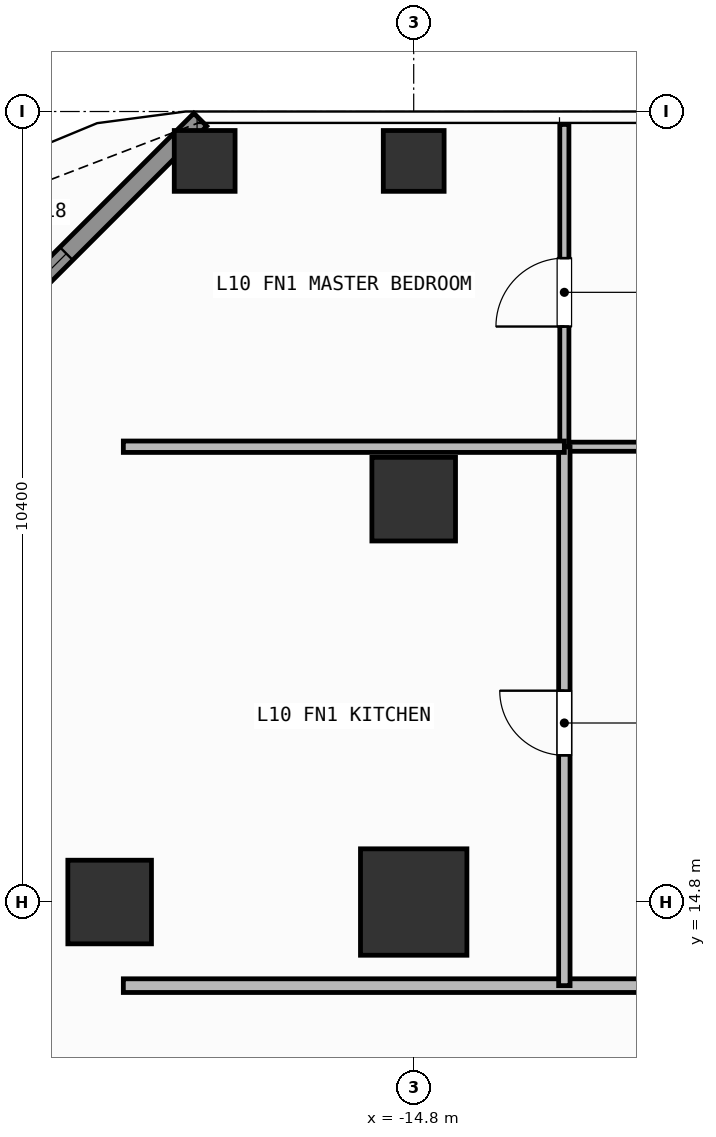
"""IFC4 building model, lengths in metres.
Left out: names, types, materials, properties, quantities, classifications, styles, units other than length and angle.
Written with IfcOpenShell. Run it as: python <this file> out.ifc"""

import sys

from ifc_helpers import new_model, si_unit, direction, frame, frame_2d, origin, origin_2d, place, context, subcontext, project, spatial, rectangle, hollow_rectangle, extrude, element, fill, save


model = new_model("IFC4")
c1 = context("Model", 3, precision=1e-05, world=origin(), true_north=direction((0.0, 1.0)))
c2 = subcontext(c1, "Body", "Model", "MODEL_VIEW")
j1 = project(units=[si_unit("LENGTHUNIT", "METRE"), si_unit("PLANEANGLEUNIT", "RADIAN")], contexts=[c1])
p1 = place(None, origin())
s1 = spatial("IfcSite", under=j1, at=p1, CompositionType="ELEMENT")
p2 = place(p1, origin())
s2 = spatial("IfcBuilding", under=s1, at=p2, CompositionType="ELEMENT")
p3 = place(p2, frame((0.0, 0.0, 38.4)))
s3 = spatial("IfcBuildingStorey", under=s2, at=p3, CompositionType="ELEMENT", Elevation=38.4)
p4 = place(p3, frame((-14.8, 14.8, 0.0), z_axis=(0.0, 0.0, 1.0), x_axis=(1.0, 0.0, 0.0)))
e1 = element("IfcColumn", 1, at=p4, inside=s3, PredefinedType="COLUMN", context=c2, shape_type="SweptSolid", body=[
    extrude(rectangle(XDim=1.4, YDim=1.4, at=origin_2d()), origin(), (0.0, 0.0, 1.0), 3.9),
])
for number, where, z_axis, x_axis in (
    (2, (-18.8, 14.8, 0.0), (0.0, 0.0, 1.0), (1.0, 0.0, 0.0)),
    (3, (-14.8, 20.1, 0.0), (0.0, 0.0, 1.0), (1.0, 0.0, 0.0)),
):
    element("IfcColumn", number, at=place(p3, frame(where, z_axis=z_axis, x_axis=x_axis)), inside=s3, PredefinedType="COLUMN", context=c2, shape_type="SweptSolid", body=[
        extrude(rectangle(XDim=1.1, YDim=1.1, at=origin_2d()), origin(), (0.0, 0.0, 1.0), 3.9),
    ])
for number, where, z_axis, x_axis in (
    (4, (-17.55, 24.55, 0.0), (0.0, 0.0, 1.0), (1.0, 0.0, 0.0)),
    (5, (-14.8, 24.55, 0.0), (0.0, 0.0, 1.0), (1.0, 0.0, 0.0)),
):
    element("IfcColumn", number, at=place(p3, frame(where, z_axis=z_axis, x_axis=x_axis)), inside=s3, PredefinedType="COLUMN", context=c2, shape_type="SweptSolid", body=[
        extrude(hollow_rectangle(XDim=0.8, YDim=0.8, WallThickness=0.036, at=origin_2d()), origin(), (0.0, 0.0, 1.0), 3.9),
    ])
p5 = place(p3, frame((-22.192, 20.508, 0.0), z_axis=(0.0, 0.0, 1.0), x_axis=(0.707106781187, 0.707106781187, 0.0)))
e6 = element("IfcWall", 6, at=p5, inside=s3, PredefinedType="SOLIDWALL", context=c2, shape_type="SweptSolid", body=[
    extrude(rectangle(XDim=6.484, YDim=0.24, at=frame_2d((3.242, 0.0))), origin(), (0.0, 0.0, 1.0), 3.68),
])
p6 = place(p5, frame((2.492, 0.0, 0.8)))
e7 = element("IfcOpeningElement", 7, at=p6, cuts=e6, PredefinedType="OPENING", context=c2, shape_type="SweptSolid", body=[
    extrude(rectangle(XDim=1.5, YDim=1.85, at=frame_2d((0.75, 0.925))), frame((0.0, 0.13, 0.0), z_axis=(0.0, -1.0, 0.0), x_axis=(1.0, 0.0, 0.0)), (0.0, 0.0, 1.0), 0.26),
])
p7 = place(p3, frame((-18.62, 13.7, 0.0), z_axis=(0.0, 0.0, 1.0), x_axis=(1.0, 0.0, 0.0)))
e8 = element("IfcWall", 8, at=p7, inside=s3, PredefinedType="PARTITIONING", context=c2, shape_type="SweptSolid", body=[
    extrude(rectangle(XDim=16.499, YDim=0.18, at=frame_2d((8.25, 0.0))), origin(), (0.0, 0.0, 1.0), 3.68),
])
p8 = place(p7, frame((8.91, 0.0, 0.0)))
e9 = element("IfcOpeningElement", 9, at=p8, cuts=e8, PredefinedType="OPENING", context=c2, shape_type="SweptSolid", body=[
    extrude(rectangle(XDim=1.0, YDim=2.2, at=frame_2d((0.5, 1.1))), frame((0.0, 0.1, 0.0), z_axis=(0.0, -1.0, 0.0), x_axis=(1.0, 0.0, 0.0)), (0.0, 0.0, 1.0), 0.2),
])
p9 = place(p3, frame((-12.818, 20.79, 0.0), z_axis=(0.0, 0.0, 1.0), x_axis=(1.0, 0.0, 0.0)))
e10 = element("IfcWall", 10, at=p9, inside=s3, PredefinedType="PARTITIONING", context=c2, shape_type="SweptSolid", body=[
    extrude(rectangle(XDim=7.368, YDim=0.12, at=frame_2d((3.684, 0.0))), origin(), (0.0, 0.0, 1.0), 3.68),
])
p10 = place(p9, frame((3.322, 0.0, 0.0)))
e11 = element("IfcOpeningElement", 11, at=p10, cuts=e10, PredefinedType="OPENING", context=c2, shape_type="SweptSolid", body=[
    extrude(rectangle(XDim=0.9, YDim=2.1, at=frame_2d((0.45, 1.05))), frame((0.0, 0.07, 0.0), z_axis=(0.0, -1.0, 0.0), x_axis=(1.0, 0.0, 0.0)), (0.0, 0.0, 1.0), 0.14),
])
p11 = place(p3, frame((-12.818, 13.7, 0.0), z_axis=(0.0, 0.0, 1.0), x_axis=(0.0, 1.0, 0.0)))
e12 = element("IfcWall", 12, at=p11, inside=s3, PredefinedType="PARTITIONING", context=c2, shape_type="SweptSolid", body=[
    extrude(rectangle(XDim=7.09, YDim=0.15, at=frame_2d((3.545, 0.0))), origin(), (0.0, 0.0, 1.0), 3.68),
])
p12 = place(p11, frame((3.03, 0.0, 0.0)))
e13 = element("IfcOpeningElement", 13, at=p12, cuts=e12, PredefinedType="OPENING", context=c2, shape_type="SweptSolid", body=[
    extrude(rectangle(XDim=0.85, YDim=2.1, at=frame_2d((0.425, 1.05))), frame((0.0, 0.085, 0.0), z_axis=(0.0, -1.0, 0.0), x_axis=(1.0, 0.0, 0.0)), (0.0, 0.0, 1.0), 0.17),
])
p13 = place(p3, frame((-12.818, 20.79, 0.0), z_axis=(0.0, 0.0, 1.0), x_axis=(0.0, 1.0, 0.0)))
e14 = element("IfcWall", 14, at=p13, inside=s3, PredefinedType="PARTITIONING", context=c2, shape_type="SweptSolid", body=[
    extrude(rectangle(XDim=4.24, YDim=0.12, at=frame_2d((2.12, 0.0))), origin(), (0.0, 0.0, 1.0), 3.68),
])
p14 = place(p13, frame((1.581, 0.0, 0.0)))
e15 = element("IfcOpeningElement", 15, at=p14, cuts=e14, PredefinedType="OPENING", context=c2, shape_type="SweptSolid", body=[
    extrude(rectangle(XDim=0.9, YDim=2.1, at=frame_2d((0.45, 1.05))), frame((0.0, 0.07, 0.0), z_axis=(0.0, -1.0, 0.0), x_axis=(1.0, 0.0, 0.0)), (0.0, 0.0, 1.0), 0.14),
])
p15 = place(p3, frame((-18.62, 20.79, 0.0), z_axis=(0.0, 0.0, 1.0), x_axis=(1.0, 0.0, 0.0)))
e16 = element("IfcWall", 16, at=p15, inside=s3, PredefinedType="PARTITIONING", context=c2, shape_type="SweptSolid", body=[
    extrude(rectangle(XDim=5.802, YDim=0.15, at=frame_2d((2.901, 0.0))), origin(), (0.0, 0.0, 1.0), 3.68),
])
p16 = place(p6, origin())
e17 = element("IfcWindow", 17, at=p16, inside=s3, PartitioningType="SINGLE_PANEL", PredefinedType="WINDOW", context=c2, shape_type="SweptSolid", body=[
    extrude(rectangle(XDim=1.5, YDim=1.85, at=frame_2d((0.75, 0.925))), frame((0.0, 0.03, 0.0), z_axis=(0.0, -1.0, 0.0), x_axis=(1.0, 0.0, 0.0)), (0.0, 0.0, 1.0), 0.06),
])
fill(e7, e17)
p17 = place(p12, origin())
e18 = element("IfcDoor", 18, at=p17, inside=s3, OperationType="SINGLE_SWING_RIGHT", PredefinedType="DOOR", context=c2, shape_type="SweptSolid", body=[
    extrude(rectangle(XDim=0.85, YDim=2.1, at=frame_2d((0.425, 1.05))), frame((0.0, 0.025, 0.0), z_axis=(0.0, -1.0, 0.0), x_axis=(1.0, 0.0, 0.0)), (0.0, 0.0, 1.0), 0.05),
])
fill(e13, e18)
p18 = place(p14, origin())
e19 = element("IfcDoor", 19, at=p18, inside=s3, OperationType="SINGLE_SWING_LEFT", PredefinedType="DOOR", context=c2, shape_type="SweptSolid", body=[
    extrude(rectangle(XDim=0.9, YDim=2.1, at=frame_2d((0.45, 1.05))), frame((0.0, 0.025, 0.0), z_axis=(0.0, -1.0, 0.0), x_axis=(1.0, 0.0, 0.0)), (0.0, 0.0, 1.0), 0.05),
])
fill(e15, e19)
save(model, sys.argv[1])
